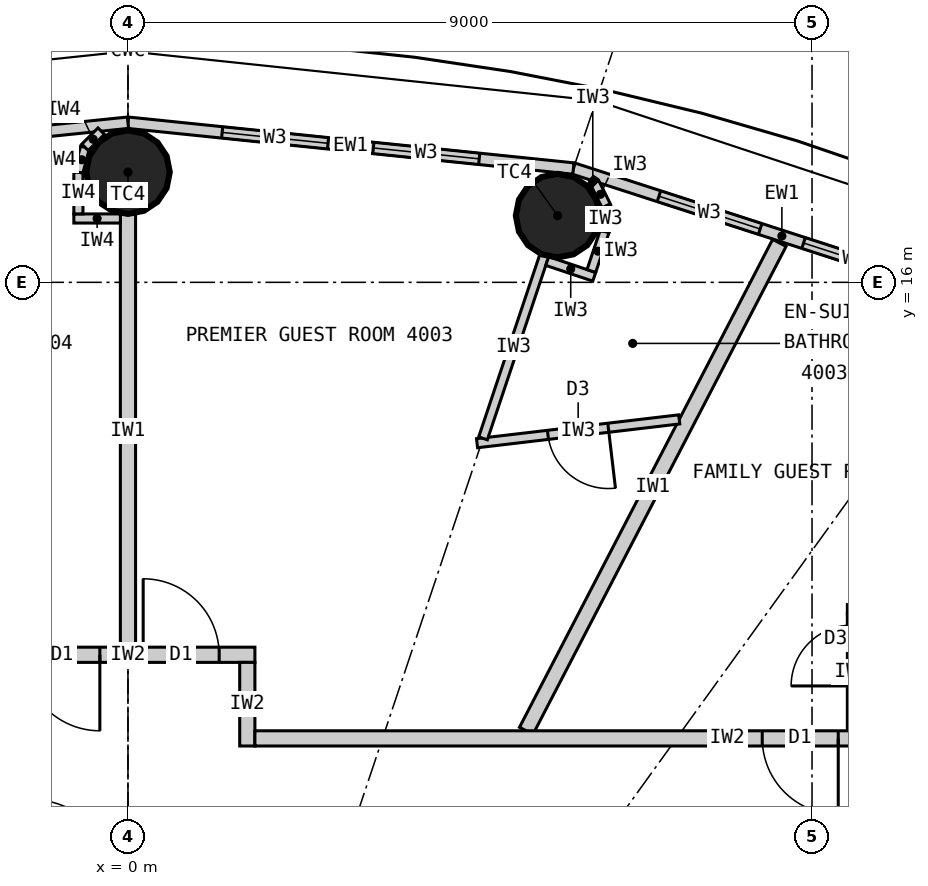
"""IFC4 building model, lengths in metres.
Left out: names, types, materials, properties, quantities, classifications, styles, units other than length and angle.
Written with IfcOpenShell. Run it as: python <this file> out.ifc"""

import sys

from ifc_helpers import new_model, si_unit, direction, frame, frame_2d, origin, origin_2d, place, context, subcontext, project, spatial, rectangle, circle, extrude, element, fill, save


model = new_model("IFC4")
c1 = context("Model", 3, precision=1e-05, world=origin(), true_north=direction((0.0, 1.0)))
c2 = subcontext(c1, "Body", "Model", "MODEL_VIEW")
j1 = project(units=[si_unit("LENGTHUNIT", "METRE"), si_unit("PLANEANGLEUNIT", "RADIAN")], contexts=[c1])
p1 = place(None, origin())
s1 = spatial("IfcSite", under=j1, at=p1, CompositionType="ELEMENT")
p2 = place(p1, origin())
s2 = spatial("IfcBuilding", under=s1, at=p2, CompositionType="ELEMENT")
p3 = place(p2, frame((0.0, 0.0, 153.3)))
s3 = spatial("IfcBuildingStorey", under=s2, at=p3, CompositionType="ELEMENT", Elevation=153.3)
for number, where, z_axis, x_axis in (
    (1, (5.653, 16.877, 0.0), (0.0, 0.0, 1.0), (1.0, 0.0, 0.0)),
    (2, (0.0, 17.45, 0.0), (0.0, 0.0, 1.0), (1.0, 0.0, 0.0)),
):
    element("IfcColumn", number, at=place(p3, frame(where, z_axis=z_axis, x_axis=x_axis)), inside=s3, PredefinedType="COLUMN", context=c2, shape_type="SweptSolid", body=[
        extrude(circle(Radius=0.55, at=origin_2d()), origin(), (0.0, 0.0, 1.0), 3.3),
    ])
p4 = place(p3, frame((11.346, 15.722, 0.0), z_axis=(0.0, 0.0, 1.0), x_axis=(-0.951432482129, 0.307857486429, 0.0)))
e3 = element("IfcWall", 3, at=p4, inside=s3, PredefinedType="ELEMENTEDWALL", context=c2, shape_type="SweptSolid", body=[
    extrude(rectangle(XDim=5.766, YDim=0.15, at=frame_2d((2.883, 0.0))), origin(), (0.0, 0.0, 1.0), 3.12),
])
p5 = place(p4, frame((1.183, 0.0, 0.9)))
e4 = element("IfcOpeningElement", 4, at=p5, cuts=e3, PredefinedType="OPENING", context=c2, shape_type="SweptSolid", body=[
    extrude(rectangle(XDim=1.4, YDim=1.9, at=frame_2d((0.7, 0.95))), frame((0.0, 0.085, 0.0), z_axis=(0.0, -1.0, 0.0), x_axis=(1.0, 0.0, 0.0)), (0.0, 0.0, 1.0), 0.17),
])
p6 = place(p4, frame((3.183, 0.0, 0.9)))
e5 = element("IfcOpeningElement", 5, at=p6, cuts=e3, PredefinedType="OPENING", context=c2, shape_type="SweptSolid", body=[
    extrude(rectangle(XDim=1.4, YDim=1.9, at=frame_2d((0.7, 0.95))), frame((0.0, 0.085, 0.0), z_axis=(0.0, -1.0, 0.0), x_axis=(1.0, 0.0, 0.0)), (0.0, 0.0, 1.0), 0.17),
])
p7 = place(p3, frame((5.86, 17.497, 0.0), z_axis=(0.0, 0.0, 1.0), x_axis=(-0.994751738032, 0.102318032045, 0.0)))
e6 = element("IfcWall", 6, at=p7, inside=s3, PredefinedType="ELEMENTEDWALL", context=c2, shape_type="SweptSolid", body=[
    extrude(rectangle(XDim=5.891, YDim=0.15, at=frame_2d((2.946, 0.0))), origin(), (0.0, 0.0, 1.0), 3.12),
])
p8 = place(p7, frame((1.246, 0.0, 0.9)))
e7 = element("IfcOpeningElement", 7, at=p8, cuts=e6, PredefinedType="OPENING", context=c2, shape_type="SweptSolid", body=[
    extrude(rectangle(XDim=1.4, YDim=1.9, at=frame_2d((0.7, 0.95))), frame((0.0, 0.085, 0.0), z_axis=(0.0, -1.0, 0.0), x_axis=(1.0, 0.0, 0.0)), (0.0, 0.0, 1.0), 0.17),
])
p9 = place(p7, frame((3.246, 0.0, 0.9)))
e8 = element("IfcOpeningElement", 8, at=p9, cuts=e6, PredefinedType="OPENING", context=c2, shape_type="SweptSolid", body=[
    extrude(rectangle(XDim=1.4, YDim=1.9, at=frame_2d((0.7, 0.95))), frame((0.0, 0.085, 0.0), z_axis=(0.0, -1.0, 0.0), x_axis=(1.0, 0.0, 0.0)), (0.0, 0.0, 1.0), 0.17),
])
p10 = place(p3, frame((0.0, 18.1, 0.0), z_axis=(0.0, 0.0, 1.0), x_axis=(-0.994751738032, -0.102318032045, 0.0)))
e9 = element("IfcWall", 9, at=p10, inside=s3, PredefinedType="ELEMENTEDWALL", context=c2, shape_type="SweptSolid", body=[
    extrude(rectangle(XDim=5.891, YDim=0.15, at=frame_2d((2.946, 0.0))), origin(), (0.0, 0.0, 1.0), 3.12),
])
p11 = place(p10, frame((1.246, 0.0, 0.9)))
e10 = element("IfcOpeningElement", 10, at=p11, cuts=e9, PredefinedType="OPENING", context=c2, shape_type="SweptSolid", body=[
    extrude(rectangle(XDim=1.4, YDim=1.9, at=frame_2d((0.7, 0.95))), frame((0.0, 0.085, 0.0), z_axis=(0.0, -1.0, 0.0), x_axis=(1.0, 0.0, 0.0)), (0.0, 0.0, 1.0), 0.17),
])
p12 = place(p10, frame((3.246, 0.0, 0.9)))
e11 = element("IfcOpeningElement", 11, at=p12, cuts=e9, PredefinedType="OPENING", context=c2, shape_type="SweptSolid", body=[
    extrude(rectangle(XDim=1.4, YDim=1.9, at=frame_2d((0.7, 0.95))), frame((0.0, 0.085, 0.0), z_axis=(0.0, -1.0, 0.0), x_axis=(1.0, 0.0, 0.0)), (0.0, 0.0, 1.0), 0.17),
])
p13 = place(p3, frame((5.24, 10.1, 0.0), z_axis=(0.0, 0.0, 1.0), x_axis=(0.460532965373, 0.887642601391, 0.0)))
e12 = element("IfcWall", 12, at=p13, inside=s3, PredefinedType="PARTITIONING", context=c2, shape_type="SweptSolid", body=[
    extrude(rectangle(XDim=7.231, YDim=0.2, at=frame_2d((3.616, 0.0))), origin(), (0.0, 0.0, 1.0), 3.12),
])
p14 = place(p3, frame((0.0, 11.2, 0.0), z_axis=(0.0, 0.0, 1.0), x_axis=(0.0, 1.0, 0.0)))
e13 = element("IfcWall", 13, at=p14, inside=s3, PredefinedType="PARTITIONING", context=c2, shape_type="SweptSolid", body=[
    extrude(rectangle(XDim=5.7, YDim=0.2, at=frame_2d((2.85, 0.0))), origin(), (0.0, 0.0, 1.0), 2.42),
])
p15 = place(p3, frame((-1.67, 11.1, 0.0), z_axis=(0.0, 0.0, 1.0), x_axis=(1.0, 0.0, 0.0)))
e14 = element("IfcWall", 14, at=p15, inside=s3, PredefinedType="PARTITIONING", context=c2, shape_type="SweptSolid", body=[
    extrude(rectangle(XDim=3.34, YDim=0.2, at=frame_2d((1.67, 0.0))), origin(), (0.0, 0.0, 1.0), 3.12),
])
p16 = place(p15, frame((1.87, 0.0, 0.0)))
e15 = element("IfcOpeningElement", 15, at=p16, cuts=e14, PredefinedType="OPENING", context=c2, shape_type="SweptSolid", body=[
    extrude(rectangle(XDim=1.0, YDim=2.2, at=frame_2d((0.5, 1.1))), frame((0.0, 0.11, 0.0), z_axis=(0.0, -1.0, 0.0), x_axis=(1.0, 0.0, 0.0)), (0.0, 0.0, 1.0), 0.22),
])
p17 = place(p15, frame((0.3, 0.0, 0.0)))
e16 = element("IfcOpeningElement", 16, at=p17, cuts=e14, PredefinedType="OPENING", context=c2, shape_type="SweptSolid", body=[
    extrude(rectangle(XDim=1.0, YDim=2.2, at=frame_2d((0.5, 1.1))), frame((0.0, 0.11, 0.0), z_axis=(0.0, -1.0, 0.0), x_axis=(1.0, 0.0, 0.0)), (0.0, 0.0, 1.0), 0.22),
])
p18 = place(p3, frame((1.57, 9.9, 0.0), z_axis=(0.0, 0.0, 1.0), x_axis=(0.0, 1.0, 0.0)))
e17 = element("IfcWall", 17, at=p18, inside=s3, PredefinedType="PARTITIONING", context=c2, shape_type="SweptSolid", body=[
    extrude(rectangle(XDim=1.1, YDim=0.2, at=frame_2d((0.55, 0.0))), origin(), (0.0, 0.0, 1.0), 3.12),
])
p19 = place(p3, frame((10.585, 11.7, 0.0), z_axis=(0.0, 0.0, 1.0), x_axis=(-1.0, 0.0, 0.0)))
e18 = element("IfcWall", 18, at=p19, inside=s3, PredefinedType="PARTITIONING", context=c2, shape_type="SweptSolid", body=[
    extrude(rectangle(XDim=1.12, YDim=0.12, at=frame_2d((0.56, 0.0))), origin(), (0.0, 0.0, 1.0), 3.12),
])
p20 = place(p3, frame((9.525, 10.1, 0.0), z_axis=(0.0, 0.0, 1.0), x_axis=(0.0, 1.0, 0.0)))
e19 = element("IfcWall", 19, at=p20, inside=s3, PredefinedType="PARTITIONING", context=c2, shape_type="SweptSolid", body=[
    extrude(rectangle(XDim=1.54, YDim=0.12, at=frame_2d((0.77, 0.0))), origin(), (0.0, 0.0, 1.0), 3.12),
])
p21 = place(p20, frame((0.59, 0.0, 0.0)))
e20 = element("IfcOpeningElement", 20, at=p21, cuts=e19, PredefinedType="OPENING", context=c2, shape_type="SweptSolid", body=[
    extrude(rectangle(XDim=0.8, YDim=2.1, at=frame_2d((0.4, 1.05))), frame((0.0, 0.07, 0.0), z_axis=(0.0, -1.0, 0.0), x_axis=(1.0, 0.0, 0.0)), (0.0, 0.0, 1.0), 0.14),
])
p22 = place(p3, frame((7.253, 14.197, 0.0), z_axis=(0.0, 0.0, 1.0), x_axis=(-0.993128188393, -0.117031625725, 0.0)))
e21 = element("IfcWall", 21, at=p22, inside=s3, PredefinedType="PARTITIONING", context=c2, shape_type="SweptSolid", body=[
    extrude(rectangle(XDim=2.678, YDim=0.12, at=frame_2d((1.339, 0.0))), origin(), (0.0, 0.0, 1.0), 3.12),
])
p23 = place(p22, frame((0.939, 0.0, 0.0)))
e22 = element("IfcOpeningElement", 22, at=p23, cuts=e21, PredefinedType="OPENING", context=c2, shape_type="SweptSolid", body=[
    extrude(rectangle(XDim=0.8, YDim=2.1, at=frame_2d((0.4, 1.05))), frame((0.0, 0.07, 0.0), z_axis=(0.0, -1.0, 0.0), x_axis=(1.0, 0.0, 0.0)), (0.0, 0.0, 1.0), 0.14),
])
p24 = place(p3, frame((4.671, 13.948, 0.0), z_axis=(0.0, 0.0, 1.0), x_axis=(0.317669167093, 0.948201613729, 0.0)))
e23 = element("IfcWall", 23, at=p24, inside=s3, PredefinedType="PARTITIONING", context=c2, shape_type="SweptSolid", body=[
    extrude(rectangle(XDim=2.54, YDim=0.12, at=frame_2d((1.27, 0.0))), origin(), (0.0, 0.0, 1.0), 2.42),
])
p25 = place(p3, frame((5.516, 16.28, 0.0), z_axis=(0.0, 0.0, 1.0), x_axis=(0.948157944392, -0.317799484717, 0.0)))
e24 = element("IfcWall", 24, at=p25, inside=s3, PredefinedType="PARTITIONING", context=c2, shape_type="SweptSolid", body=[
    extrude(rectangle(XDim=0.652, YDim=0.12, at=frame_2d((0.326, 0.0))), origin(), (0.0, 0.0, 1.0), 3.12),
])
p26 = place(p3, frame((6.097, 16.149, 0.0), z_axis=(0.0, 0.0, 1.0), x_axis=(0.317292604854, 0.948327687514, 0.0)))
e25 = element("IfcWall", 25, at=p26, inside=s3, PredefinedType="PARTITIONING", context=c2, shape_type="SweptSolid", body=[
    extrude(rectangle(XDim=0.55, YDim=0.12, at=frame_2d((0.275, 0.0))), origin(), (0.0, 0.0, 1.0), 3.12),
])
for number, where, z_axis, x_axis in (
    (26, (6.271, 16.67, 0.0), (0.0, 0.0, 1.0), (0.061, 0.998, 0.0)),
    (27, (6.292, 17.007, 0.0), (0.0, 0.0, 1.0), (-0.445, 0.895, 0.0)),
):
    element("IfcWall", number, at=place(p3, frame(where, z_axis=z_axis, x_axis=x_axis)), inside=s3, PredefinedType="PARTITIONING", context=c2, shape_type="SweptSolid", body=[
        extrude(rectangle(XDim=0.338, YDim=0.12, at=frame_2d((0.169, 0.0))), origin(), (0.0, 0.0, 1.0), 3.12),
    ])
p27 = place(p3, frame((6.142, 17.31, 0.0), z_axis=(0.0, 0.0, 1.0), x_axis=(-0.835039693181, 0.550189704386, 0.0)))
e28 = element("IfcWall", 28, at=p27, inside=s3, PredefinedType="PARTITIONING", context=c2, shape_type="SweptSolid", body=[
    extrude(rectangle(XDim=0.062, YDim=0.12, at=frame_2d((0.031, 0.0))), origin(), (0.0, 0.0, 1.0), 3.12),
])
p28 = place(p3, frame((1.67, 10.0, 0.0), z_axis=(0.0, 0.0, 1.0), x_axis=(1.0, 0.0, 0.0)))
e29 = element("IfcWall", 29, at=p28, inside=s3, PredefinedType="PARTITIONING", context=c2, shape_type="SweptSolid", body=[
    extrude(rectangle(XDim=12.43, YDim=0.2, at=frame_2d((6.215, 0.0))), origin(), (0.0, 0.0, 1.0), 3.12),
])
p29 = place(p28, frame((6.675, 0.0, 0.0)))
e30 = element("IfcOpeningElement", 30, at=p29, cuts=e29, PredefinedType="OPENING", context=c2, shape_type="SweptSolid", body=[
    extrude(rectangle(XDim=1.0, YDim=2.2, at=frame_2d((0.5, 1.1))), frame((0.0, 0.11, 0.0), z_axis=(0.0, -1.0, 0.0), x_axis=(1.0, 0.0, 0.0)), (0.0, 0.0, 1.0), 0.22),
])
p30 = place(p3, frame((-0.1, 16.84, 0.0), z_axis=(0.0, 0.0, 1.0), x_axis=(-1.0, 0.0, 0.0)))
e31 = element("IfcWall", 31, at=p30, inside=s3, PredefinedType="PARTITIONING", context=c2, shape_type="SweptSolid", body=[
    extrude(rectangle(XDim=0.612, YDim=0.12, at=frame_2d((0.306, 0.0))), origin(), (0.0, 0.0, 1.0), 3.12),
])
p31 = place(p3, frame((-0.652, 16.9, 0.0), z_axis=(0.0, 0.0, 1.0), x_axis=(0.0, 1.0, 0.0)))
e32 = element("IfcWall", 32, at=p31, inside=s3, PredefinedType="PARTITIONING", context=c2, shape_type="SweptSolid", body=[
    extrude(rectangle(XDim=0.55, YDim=0.12, at=frame_2d((0.275, 0.0))), origin(), (0.0, 0.0, 1.0), 3.12),
])
p32 = place(p3, frame((-0.652, 17.45, 0.0), z_axis=(0.0, 0.0, 1.0), x_axis=(0.258832454679, 0.965922233104, 0.0)))
e33 = element("IfcWall", 33, at=p32, inside=s3, PredefinedType="PARTITIONING", context=c2, shape_type="SweptSolid", body=[
    extrude(rectangle(XDim=0.338, YDim=0.12, at=frame_2d((0.169, 0.0))), origin(), (0.0, 0.0, 1.0), 3.12),
])
p33 = place(p3, frame((-0.565, 17.776, 0.0), z_axis=(0.0, 0.0, 1.0), x_axis=(0.707106781187, 0.707106781187, 0.0)))
e34 = element("IfcWall", 34, at=p33, inside=s3, PredefinedType="PARTITIONING", context=c2, shape_type="SweptSolid", body=[
    extrude(rectangle(XDim=0.301, YDim=0.12, at=frame_2d((0.15, 0.0))), origin(), (0.0, 0.0, 1.0), 3.12),
])
p34 = place(p5, origin())
e35 = element("IfcWindow", 35, at=p34, inside=s3, PartitioningType="SINGLE_PANEL", PredefinedType="WINDOW", context=c2, shape_type="SweptSolid", body=[
    extrude(rectangle(XDim=1.4, YDim=1.9, at=frame_2d((0.7, 0.95))), frame((0.0, 0.03, 0.0), z_axis=(0.0, -1.0, 0.0), x_axis=(1.0, 0.0, 0.0)), (0.0, 0.0, 1.0), 0.06),
])
fill(e4, e35)
p35 = place(p6, origin())
e36 = element("IfcWindow", 36, at=p35, inside=s3, PartitioningType="SINGLE_PANEL", PredefinedType="WINDOW", context=c2, shape_type="SweptSolid", body=[
    extrude(rectangle(XDim=1.4, YDim=1.9, at=frame_2d((0.7, 0.95))), frame((0.0, 0.03, 0.0), z_axis=(0.0, -1.0, 0.0), x_axis=(1.0, 0.0, 0.0)), (0.0, 0.0, 1.0), 0.06),
])
fill(e5, e36)
p36 = place(p8, origin())
e37 = element("IfcWindow", 37, at=p36, inside=s3, PartitioningType="SINGLE_PANEL", PredefinedType="WINDOW", context=c2, shape_type="SweptSolid", body=[
    extrude(rectangle(XDim=1.4, YDim=1.9, at=frame_2d((0.7, 0.95))), frame((0.0, 0.03, 0.0), z_axis=(0.0, -1.0, 0.0), x_axis=(1.0, 0.0, 0.0)), (0.0, 0.0, 1.0), 0.06),
])
fill(e7, e37)
p37 = place(p9, origin())
e38 = element("IfcWindow", 38, at=p37, inside=s3, PartitioningType="SINGLE_PANEL", PredefinedType="WINDOW", context=c2, shape_type="SweptSolid", body=[
    extrude(rectangle(XDim=1.4, YDim=1.9, at=frame_2d((0.7, 0.95))), frame((0.0, 0.03, 0.0), z_axis=(0.0, -1.0, 0.0), x_axis=(1.0, 0.0, 0.0)), (0.0, 0.0, 1.0), 0.06),
])
fill(e8, e38)
p38 = place(p29, origin())
e39 = element("IfcDoor", 39, at=p38, inside=s3, OperationType="SINGLE_SWING_RIGHT", PredefinedType="DOOR", context=c2, shape_type="SweptSolid", body=[
    extrude(rectangle(XDim=1.0, YDim=2.2, at=frame_2d((0.5, 1.1))), frame((0.0, 0.025, 0.0), z_axis=(0.0, -1.0, 0.0), x_axis=(1.0, 0.0, 0.0)), (0.0, 0.0, 1.0), 0.05),
])
fill(e30, e39)
p39 = place(p23, origin())
e40 = element("IfcDoor", 40, at=p39, inside=s3, OperationType="SINGLE_SWING_LEFT", PredefinedType="DOOR", context=c2, shape_type="SweptSolid", body=[
    extrude(rectangle(XDim=0.8, YDim=2.1, at=frame_2d((0.4, 1.05))), frame((0.0, 0.025, 0.0), z_axis=(0.0, -1.0, 0.0), x_axis=(1.0, 0.0, 0.0)), (0.0, 0.0, 1.0), 0.05),
])
fill(e22, e40)
p40 = place(p16, origin())
e41 = element("IfcDoor", 41, at=p40, inside=s3, OperationType="SINGLE_SWING_LEFT", PredefinedType="DOOR", context=c2, shape_type="SweptSolid", body=[
    extrude(rectangle(XDim=1.0, YDim=2.2, at=frame_2d((0.5, 1.1))), frame((0.0, 0.025, 0.0), z_axis=(0.0, -1.0, 0.0), x_axis=(1.0, 0.0, 0.0)), (0.0, 0.0, 1.0), 0.05),
])
fill(e15, e41)
p41 = place(p17, origin())
e42 = element("IfcDoor", 42, at=p41, inside=s3, OperationType="SINGLE_SWING_RIGHT", PredefinedType="DOOR", context=c2, shape_type="SweptSolid", body=[
    extrude(rectangle(XDim=1.0, YDim=2.2, at=frame_2d((0.5, 1.1))), frame((0.0, 0.025, 0.0), z_axis=(0.0, -1.0, 0.0), x_axis=(1.0, 0.0, 0.0)), (0.0, 0.0, 1.0), 0.05),
])
fill(e16, e42)
save(model, sys.argv[1])
